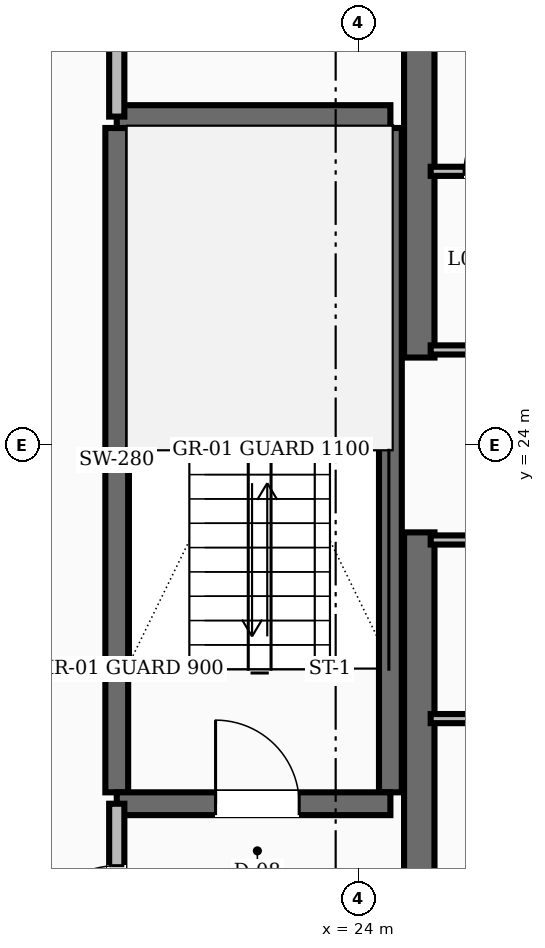
"""IFC4 building model, lengths in metres.
Left out: names, types, materials, properties, quantities, classifications, styles, units other than length and angle.
Written with IfcOpenShell. Run it as: python <this file> out.ifc"""

import sys

from ifc_helpers import new_model, si_unit, direction, frame, frame_2d, origin, place, context, subcontext, project, spatial, rectangle, extrude, element, fill, save


model = new_model("IFC4")
c1 = context("Model", 3, precision=1e-05, world=origin(), true_north=direction((0.0, 1.0)))
c2 = subcontext(c1, "Body", "Model", "MODEL_VIEW")
j1 = project(units=[si_unit("LENGTHUNIT", "METRE"), si_unit("PLANEANGLEUNIT", "RADIAN")], contexts=[c1])
p1 = place(None, origin())
s1 = spatial("IfcSite", under=j1, at=p1, CompositionType="ELEMENT")
p2 = place(p1, origin())
s2 = spatial("IfcBuilding", under=s1, at=p2, CompositionType="ELEMENT")
p3 = place(p2, frame((0.0, 0.0, 34.0)))
s3 = spatial("IfcBuildingStorey", under=s2, at=p3, CompositionType="ELEMENT", Elevation=34.0)
for number, where, z_axis, x_axis in (
    (1, (24.8, 16.55, 0.0), (0.0, 0.0, 1.0), (0.0, 1.0, 0.0)),
    (2, (24.8, 25.15, 0.0), (0.0, 0.0, 1.0), (0.0, 1.0, 0.0)),
):
    element("IfcWall", number, at=place(p3, frame(where, z_axis=z_axis, x_axis=x_axis)), inside=s3, PredefinedType="SHEAR", context=c2, shape_type="SweptSolid", body=[
        extrude(rectangle(XDim=6.3, YDim=0.4, at=frame_2d((3.15, 0.0))), origin(), (0.0, 0.0, 1.0), 3.6),
    ])
for number, where, z_axis, x_axis in (
    (3, (20.82, 19.43, 0.0), (0.0, 0.0, 1.0), (0.0, 1.0, 0.0)),
    (4, (24.42, 19.43, 0.0), (0.0, 0.0, 1.0), (0.0, 1.0, 0.0)),
):
    element("IfcWall", number, at=place(p3, frame(where, z_axis=z_axis, x_axis=x_axis)), inside=s3, PredefinedType="SHEAR", context=c2, shape_type="SweptSolid", body=[
        extrude(rectangle(XDim=8.74, YDim=0.3, at=frame_2d((4.37, 0.0))), origin(), (0.0, 0.0, 1.0), 3.6),
    ])
p4 = place(p3, frame((20.82, 19.28, 0.0), z_axis=(0.0, 0.0, 1.0), x_axis=(1.0, 0.0, 0.0)))
e5 = element("IfcWall", 5, at=p4, inside=s3, PredefinedType="SHEAR", context=c2, shape_type="SweptSolid", body=[
    extrude(rectangle(XDim=3.6, YDim=0.3, at=frame_2d((1.8, 0.0))), origin(), (0.0, 0.0, 1.0), 3.6),
])
p5 = place(p4, frame((1.3, 0.0, 0.0)))
e6 = element("IfcOpeningElement", 6, at=p5, cuts=e5, PredefinedType="OPENING", context=c2, shape_type="SweptSolid", body=[
    extrude(rectangle(XDim=1.1, YDim=2.1, at=frame_2d((0.55, 1.05))), frame((0.0, 0.16, 0.0), z_axis=(0.0, -1.0, 0.0), x_axis=(1.0, 0.0, 0.0)), (0.0, 0.0, 1.0), 0.32),
])
p6 = place(p3, frame((20.82, 28.32, 0.0), z_axis=(0.0, 0.0, 1.0), x_axis=(1.0, 0.0, 0.0)))
e7 = element("IfcWall", 7, at=p6, inside=s3, PredefinedType="SHEAR", context=c2, shape_type="SweptSolid", body=[
    extrude(rectangle(XDim=3.6, YDim=0.3, at=frame_2d((1.8, 0.0))), origin(), (0.0, 0.0, 1.0), 3.6),
])
p7 = place(p3, frame((20.82, 16.55, 0.0), z_axis=(0.0, 0.0, 1.0), x_axis=(0.0, 1.0, 0.0)))
e8 = element("IfcWall", 8, at=p7, inside=s3, PredefinedType="SOLIDWALL", context=c2, shape_type="SweptSolid", body=[
    extrude(rectangle(XDim=2.73, YDim=0.2, at=frame_2d((1.365, 0.0))), origin(), (0.0, 0.0, 1.0), 2.61),
])
p8 = place(p7, frame((0.815, 0.0, 0.0)))
e9 = element("IfcOpeningElement", 9, at=p8, cuts=e8, PredefinedType="OPENING", context=c2, shape_type="SweptSolid", body=[
    extrude(rectangle(XDim=1.1, YDim=2.1, at=frame_2d((0.55, 1.05))), frame((0.0, 0.11, 0.0), z_axis=(0.0, -1.0, 0.0), x_axis=(1.0, 0.0, 0.0)), (0.0, 0.0, 1.0), 0.22),
])
p9 = place(p3, frame((20.82, 28.32, 0.0), z_axis=(0.0, 0.0, 1.0), x_axis=(0.0, 1.0, 0.0)))
e10 = element("IfcWall", 10, at=p9, inside=s3, PredefinedType="SOLIDWALL", context=c2, shape_type="SweptSolid", body=[
    extrude(rectangle(XDim=3.13, YDim=0.2, at=frame_2d((1.565, 0.0))), origin(), (0.0, 0.0, 1.0), 2.61),
])
p10 = place(p9, frame((1.09, 0.0, 0.0)))
e11 = element("IfcOpeningElement", 11, at=p10, cuts=e10, PredefinedType="OPENING", context=c2, shape_type="SweptSolid", body=[
    extrude(rectangle(XDim=0.95, YDim=2.1, at=frame_2d((0.475, 1.05))), frame((0.0, 0.11, 0.0), z_axis=(0.0, -1.0, 0.0), x_axis=(1.0, 0.0, 0.0)), (0.0, 0.0, 1.0), 0.22),
])
p11 = place(p3, frame((24.95, 25.25, 0.0), z_axis=(0.0, 0.0, 1.0), x_axis=(1.0, 0.0, 0.0)))
e12 = element("IfcWall", 12, at=p11, inside=s3, PredefinedType="PARTITIONING", context=c2, shape_type="SweptSolid", body=[
    extrude(rectangle(XDim=3.2, YDim=0.12, at=frame_2d((1.6, 0.0))), origin(), (0.0, 0.0, 1.0), 2.61),
])
p12 = place(p11, frame((1.125, 0.0, 0.0)))
e13 = element("IfcOpeningElement", 13, at=p12, cuts=e12, PredefinedType="OPENING", context=c2, shape_type="SweptSolid", body=[
    extrude(rectangle(XDim=0.95, YDim=2.1, at=frame_2d((0.475, 1.05))), frame((0.0, 0.07, 0.0), z_axis=(0.0, -1.0, 0.0), x_axis=(1.0, 0.0, 0.0)), (0.0, 0.0, 1.0), 0.14),
])
p13 = place(p3, frame((24.95, 22.75, 0.0), z_axis=(0.0, 0.0, 1.0), x_axis=(1.0, 0.0, 0.0)))
e14 = element("IfcWall", 14, at=p13, inside=s3, PredefinedType="PARTITIONING", context=c2, shape_type="SweptSolid", body=[
    extrude(rectangle(XDim=3.2, YDim=0.12, at=frame_2d((1.6, 0.0))), origin(), (0.0, 0.0, 1.0), 2.61),
])
p14 = place(p13, frame((1.125, 0.0, 0.0)))
e15 = element("IfcOpeningElement", 15, at=p14, cuts=e14, PredefinedType="OPENING", context=c2, shape_type="SweptSolid", body=[
    extrude(rectangle(XDim=0.95, YDim=2.1, at=frame_2d((0.475, 1.05))), frame((0.0, 0.07, 0.0), z_axis=(0.0, -1.0, 0.0), x_axis=(1.0, 0.0, 0.0)), (0.0, 0.0, 1.0), 0.14),
])
p15 = place(p3, frame((24.95, 27.6, 0.0), z_axis=(0.0, 0.0, 1.0), x_axis=(1.0, 0.0, 0.0)))
e16 = element("IfcWall", 16, at=p15, inside=s3, PredefinedType="PARTITIONING", context=c2, shape_type="SweptSolid", body=[
    extrude(rectangle(XDim=3.2, YDim=0.12, at=frame_2d((1.6, 0.0))), origin(), (0.0, 0.0, 1.0), 2.61),
])
p16 = place(p15, frame((0.44, 0.0, 0.0)))
e17 = element("IfcOpeningElement", 17, at=p16, cuts=e16, PredefinedType="OPENING", context=c2, shape_type="SweptSolid", body=[
    extrude(rectangle(XDim=0.86, YDim=2.1, at=frame_2d((0.43, 1.05))), frame((0.0, 0.07, 0.0), z_axis=(0.0, -1.0, 0.0), x_axis=(1.0, 0.0, 0.0)), (0.0, 0.0, 1.0), 0.14),
])
p17 = place(p15, frame((1.9, 0.0, 0.0)))
e18 = element("IfcOpeningElement", 18, at=p17, cuts=e16, PredefinedType="OPENING", context=c2, shape_type="SweptSolid", body=[
    extrude(rectangle(XDim=0.86, YDim=2.1, at=frame_2d((0.43, 1.05))), frame((0.0, 0.07, 0.0), z_axis=(0.0, -1.0, 0.0), x_axis=(1.0, 0.0, 0.0)), (0.0, 0.0, 1.0), 0.14),
])
p18 = place(p3, frame((24.95, 20.4, 0.0), z_axis=(0.0, 0.0, 1.0), x_axis=(1.0, 0.0, 0.0)))
e19 = element("IfcWall", 19, at=p18, inside=s3, PredefinedType="PARTITIONING", context=c2, shape_type="SweptSolid", body=[
    extrude(rectangle(XDim=3.2, YDim=0.12, at=frame_2d((1.6, 0.0))), origin(), (0.0, 0.0, 1.0), 2.61),
])
p19 = place(p18, frame((1.125, 0.0, 0.0)))
e20 = element("IfcOpeningElement", 20, at=p19, cuts=e19, PredefinedType="OPENING", context=c2, shape_type="SweptSolid", body=[
    extrude(rectangle(XDim=0.95, YDim=2.1, at=frame_2d((0.475, 1.05))), frame((0.0, 0.07, 0.0), z_axis=(0.0, -1.0, 0.0), x_axis=(1.0, 0.0, 0.0)), (0.0, 0.0, 1.0), 0.14),
])
p20 = place(p5, origin())
e21 = element("IfcDoor", 21, at=p20, inside=s3, OperationType="SINGLE_SWING_LEFT", PredefinedType="DOOR", context=c2, shape_type="SweptSolid", body=[
    extrude(rectangle(XDim=1.1, YDim=2.1, at=frame_2d((0.55, 1.05))), frame((0.0, 0.025, 0.0), z_axis=(0.0, -1.0, 0.0), x_axis=(1.0, 0.0, 0.0)), (0.0, 0.0, 1.0), 0.05),
])
fill(e6, e21)
p21 = place(p8, origin())
e22 = element("IfcDoor", 22, at=p21, inside=s3, OperationType="SINGLE_SWING_LEFT", PredefinedType="DOOR", context=c2, shape_type="SweptSolid", body=[
    extrude(rectangle(XDim=1.1, YDim=2.1, at=frame_2d((0.55, 1.05))), frame((0.0, 0.025, 0.0), z_axis=(0.0, -1.0, 0.0), x_axis=(1.0, 0.0, 0.0)), (0.0, 0.0, 1.0), 0.05),
])
fill(e9, e22)
p22 = place(p16, origin())
e23 = element("IfcDoor", 23, at=p22, inside=s3, OperationType="SINGLE_SWING_RIGHT", PredefinedType="DOOR", context=c2, shape_type="SweptSolid", body=[
    extrude(rectangle(XDim=0.86, YDim=2.1, at=frame_2d((0.43, 1.05))), frame((0.0, 0.025, 0.0), z_axis=(0.0, -1.0, 0.0), x_axis=(1.0, 0.0, 0.0)), (0.0, 0.0, 1.0), 0.05),
])
fill(e17, e23)
save(model, sys.argv[1])
